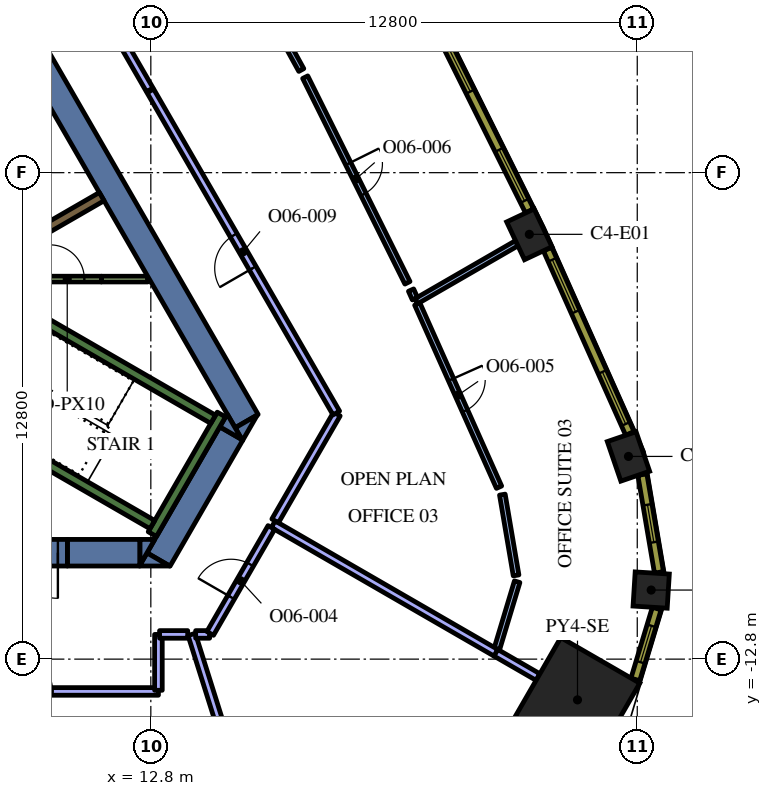
"""IFC4 building model, lengths in metres.
Left out: names, types, materials, properties, quantities, classifications, styles, units other than length and angle.
Written with IfcOpenShell. Run it as: python <this file> out.ifc"""

import sys

from ifc_helpers import new_model, si_unit, direction, frame, frame_2d, origin, origin_2d, place, context, subcontext, project, spatial, polyline, rectangle, outline, extrude, element, fill, save


model = new_model("IFC4")
c1 = context("Model", 3, precision=1e-05, world=origin(), true_north=direction((0.0, 1.0)))
c2 = subcontext(c1, "Body", "Model", "MODEL_VIEW")
j1 = project(units=[si_unit("LENGTHUNIT", "METRE"), si_unit("PLANEANGLEUNIT", "RADIAN")], contexts=[c1])
p1 = place(None, origin())
s1 = spatial("IfcSite", under=j1, at=p1, CompositionType="ELEMENT")
p2 = place(p1, origin())
s2 = spatial("IfcBuilding", under=s1, at=p2, CompositionType="ELEMENT")
p3 = place(p2, frame((0.0, 0.0, 210.0)))
s3 = spatial("IfcBuildingStorey", under=s2, at=p3, CompositionType="ELEMENT", Elevation=210.0)
p4 = place(p3, frame((24.027, -13.872, 0.0), z_axis=(0.0, 0.0, 1.0), x_axis=(0.866025403784, -0.5, 0.0)))
e1 = element("IfcColumn", 1, at=p4, inside=s3, PredefinedType="COLUMN", context=c2, shape_type="SweptSolid", body=[
    extrude(rectangle(XDim=2.4, YDim=2.4, at=origin_2d()), origin(), (0.0, 0.0, 1.0), 4.2),
])
p5 = place(p3, frame((25.967, -10.982, 0.0), z_axis=(0.0, 0.0, 1.0), x_axis=(0.062217428964, 0.998062619044, 0.0)))
e2 = element("IfcColumn", 2, at=p5, inside=s3, PredefinedType="COLUMN", context=c2, shape_type="SweptSolid", body=[
    extrude(rectangle(XDim=0.9, YDim=0.9, at=origin_2d()), origin(), (0.0, 0.0, 1.0), 4.2),
])
for number, where, z_axis, x_axis in (
    (3, (25.369, -7.466, 0.0), (0.0, 0.0, 1.0), (-0.324, 0.946, 0.0)),
    (4, (22.76, -1.623, 0.0), (0.0, 0.0, 1.0), (-0.426, 0.905, 0.0)),
):
    element("IfcColumn", number, at=place(p3, frame(where, z_axis=z_axis, x_axis=x_axis)), inside=s3, PredefinedType="COLUMN", context=c2, shape_type="SweptSolid", body=[
        extrude(rectangle(XDim=1.1, YDim=0.8, at=origin_2d()), origin(), (0.0, 0.0, 1.0), 4.2),
    ])
p6 = place(p3, frame((9.085, 4.264, 0.0), z_axis=(0.0, 0.0, 1.0), x_axis=(0.499998082512, -0.866026510844, 0.0)))
e5 = element("IfcWall", 5, at=p6, inside=s3, PredefinedType="SOLIDWALL", context=c2, shape_type="SweptSolid", body=[
    extrude(rectangle(XDim=12.472, YDim=0.7, at=frame_2d((6.236, 0.0))), origin(), (0.0, 0.0, 1.0), 4.2),
])
p7 = place(p3, origin())
e6 = element("IfcWall", 6, at=p7, inside=s3, PredefinedType="SOLIDWALL", context=c2, shape_type="SweptSolid", body=[
    extrude(outline(polyline([(15.213, -7.05), (15.019, -6.714), (15.601, -6.378), (15.213, -7.05)])), origin(), (0.0, 0.0, 1.0), 4.2),
])
p8 = place(p3, frame((13.003, -10.179, 0.0), z_axis=(0.0, 0.0, 1.0), x_axis=(0.499972675833, 0.866041178825, 0.0)))
e7 = element("IfcWall", 7, at=p8, inside=s3, PredefinedType="SOLIDWALL", context=c2, shape_type="SweptSolid", body=[
    extrude(rectangle(XDim=3.829, YDim=0.7, at=frame_2d((1.915, 0.0))), origin(), (0.0, 0.0, 1.0), 4.2),
])
e8 = element("IfcWall", 8, at=p7, inside=s3, PredefinedType="SOLIDWALL", context=c2, shape_type="SweptSolid", body=[
    extrude(outline(polyline([(12.698, -10.005), (13.296, -10.35), (12.5, -10.35), (12.698, -10.005)])), origin(), (0.0, 0.0, 1.0), 4.2),
])
e9 = element("IfcWall", 9, at=p7, inside=s3, PredefinedType="SOLIDWALL", context=c2, shape_type="SweptSolid", body=[
    extrude(outline(polyline([(14.809, -6.35), (15.197, -7.022), (14.615, -6.686), (14.809, -6.35)])), origin(), (0.0, 0.0, 1.0), 4.2),
])
p9 = place(p3, frame((10.604, -10.0, 0.0), z_axis=(0.0, 0.0, 1.0), x_axis=(1.0, 0.0, 0.0)))
e10 = element("IfcWall", 10, at=p9, inside=s3, PredefinedType="SOLIDWALL", context=c2, shape_type="SweptSolid", body=[
    extrude(rectangle(XDim=1.909, YDim=0.7, at=frame_2d((0.955, 0.0))), origin(), (0.0, 0.0, 1.0), 4.2),
])
e11 = element("IfcWall", 11, at=p7, inside=s3, PredefinedType="SOLIDWALL", context=c2, shape_type="SweptSolid", body=[
    extrude(outline(polyline([(12.904, -9.65), (12.516, -10.322), (12.516, -9.65), (12.904, -9.65)])), origin(), (0.0, 0.0, 1.0), 4.2),
])
p10 = place(p3, frame((12.84, -9.511, 0.0), z_axis=(0.0, 0.0, 1.0), x_axis=(0.500048121057, 0.865997619297, 0.0)))
e12 = element("IfcWall", 12, at=p10, inside=s3, PredefinedType="SOLIDWALL", context=c2, shape_type="SweptSolid", body=[
    extrude(rectangle(XDim=3.634, YDim=0.25, at=frame_2d((1.817, 0.0))), origin(), (0.0, 0.0, 1.0), 4.2),
])
p11 = place(p3, frame((12.84, -9.261, 0.0), z_axis=(0.0, 0.0, 1.0), x_axis=(-0.866013990052, 0.500019768644, 0.0)))
e13 = element("IfcWall", 13, at=p11, inside=s3, PredefinedType="SOLIDWALL", context=c2, shape_type="SweptSolid", body=[
    extrude(rectangle(XDim=6.8, YDim=0.25, at=frame_2d((3.4, 0.0))), origin(), (0.0, 0.0, 1.0), 4.2),
])
p12 = place(p3, frame((8.334, -2.964, 0.0), z_axis=(0.0, 0.0, 1.0), x_axis=(0.866016039709, -0.500016218704, 0.0)))
e14 = element("IfcWall", 14, at=p12, inside=s3, PredefinedType="SOLIDWALL", context=c2, shape_type="SweptSolid", body=[
    extrude(rectangle(XDim=7.05, YDim=0.25, at=frame_2d((3.525, 0.0))), origin(), (0.0, 0.0, 1.0), 4.2),
])
p13 = place(p3, frame((11.507, -0.631, 0.0), z_axis=(0.0, 0.0, 1.0), x_axis=(-0.866011447264, -0.500024172624, 0.0)))
e15 = element("IfcWall", 15, at=p13, inside=s3, PredefinedType="SOLIDWALL", context=c2, shape_type="SweptSolid", body=[
    extrude(rectangle(XDim=5.65, YDim=0.25, at=frame_2d((2.825, 0.0))), origin(), (0.0, 0.0, 1.0), 4.2),
])
p14 = place(p3, frame((11.5, -2.801, 0.0), z_axis=(0.0, 0.0, 1.0), x_axis=(1.0, 0.0, 0.0)))
e16 = element("IfcWall", 16, at=p14, inside=s3, PredefinedType="PARTITIONING", context=c2, shape_type="SweptSolid", body=[
    extrude(rectangle(XDim=1.222, YDim=0.15, at=frame_2d((0.611, 0.0))), origin(), (0.0, 0.0, 1.0), 3.45),
])
p15 = place(p3, frame((10.604, -10.0, 0.0), z_axis=(0.0, 0.0, 1.0), x_axis=(-1.0, 0.0, 0.0)))
e17 = element("IfcWall", 17, at=p15, inside=s3, PredefinedType="SOLIDWALL", context=c2, shape_type="SweptSolid", body=[
    extrude(rectangle(XDim=1.7, YDim=0.7, at=frame_2d((0.85, 0.0))), origin(), (0.0, 0.0, 1.0), 4.2),
])
p16 = place(p15, frame((0.25, 0.0, 0.0)))
e18 = element("IfcOpeningElement", 18, at=p16, cuts=e17, PredefinedType="OPENING", context=c2, shape_type="SweptSolid", body=[
    extrude(rectangle(XDim=1.2, YDim=2.1, at=frame_2d((0.6, 1.05))), frame((0.0, 0.36, 0.0), z_axis=(0.0, -1.0, 0.0), x_axis=(1.0, 0.0, 0.0)), (0.0, 0.0, 1.0), 0.72),
])
p17 = place(p3, frame((9.7, -2.8, 0.0), z_axis=(0.0, 0.0, 1.0), x_axis=(1.0, 0.0, 0.0)))
e19 = element("IfcWall", 19, at=p17, inside=s3, PredefinedType="PARTITIONING", context=c2, shape_type="SweptSolid", body=[
    extrude(rectangle(XDim=1.8, YDim=0.15, at=frame_2d((0.9, 0.0))), origin(), (0.0, 0.0, 1.0), 3.45),
])
p18 = place(p17, frame((0.45, 0.0, 0.0)))
e20 = element("IfcOpeningElement", 20, at=p18, cuts=e19, PredefinedType="OPENING", context=c2, shape_type="SweptSolid", body=[
    extrude(rectangle(XDim=0.9, YDim=2.1, at=frame_2d((0.45, 1.05))), frame((0.0, 0.085, 0.0), z_axis=(0.0, -1.0, 0.0), x_axis=(1.0, 0.0, 0.0)), (0.0, 0.0, 1.0), 0.17),
])
p19 = place(p3, frame((13.875, -12.15, 0.0), z_axis=(0.0, 0.0, 1.0), x_axis=(0.3005606746, -0.953762696316, 0.0)))
e21 = element("IfcWall", 21, at=p19, inside=s3, PredefinedType="PARTITIONING", context=c2, shape_type="SweptSolid", body=[
    extrude(rectangle(XDim=6.9, YDim=0.2, at=frame_2d((3.45, 0.0))), origin(), (0.0, 0.0, 1.0), 3.45),
])
p20 = place(p3, frame((6.517, -13.65, 0.0), z_axis=(0.0, 0.0, 1.0), x_axis=(1.0, 0.0, 0.0)))
e22 = element("IfcWall", 22, at=p20, inside=s3, PredefinedType="PARTITIONING", context=c2, shape_type="SweptSolid", body=[
    extrude(rectangle(XDim=6.483, YDim=0.2, at=frame_2d((3.242, 0.0))), origin(), (0.0, 0.0, 1.0), 3.45),
])
p21 = place(p20, frame((2.7, 0.0, 0.0)))
e23 = element("IfcOpeningElement", 23, at=p21, cuts=e22, PredefinedType="OPENING", context=c2, shape_type="SweptSolid", body=[
    extrude(rectangle(XDim=1.0, YDim=2.1, at=frame_2d((0.5, 1.05))), frame((0.0, 0.11, 0.0), z_axis=(0.0, -1.0, 0.0), x_axis=(1.0, 0.0, 0.0)), (0.0, 0.0, 1.0), 0.22),
])
p22 = place(p3, frame((13.0, -13.62, 0.0), z_axis=(0.0, 0.0, 1.0), x_axis=(0.0, 1.0, 0.0)))
e24 = element("IfcWall", 24, at=p22, inside=s3, PredefinedType="PARTITIONING", context=c2, shape_type="SweptSolid", body=[
    extrude(rectangle(XDim=1.47, YDim=0.2, at=frame_2d((0.735, 0.0))), origin(), (0.0, 0.0, 1.0), 3.45),
])
p23 = place(p3, frame((13.03, -12.15, 0.0), z_axis=(0.0, 0.0, 1.0), x_axis=(1.0, 0.0, 0.0)))
e25 = element("IfcWall", 25, at=p23, inside=s3, PredefinedType="PARTITIONING", context=c2, shape_type="SweptSolid", body=[
    extrude(rectangle(XDim=0.74, YDim=0.2, at=frame_2d((0.37, 0.0))), origin(), (0.0, 0.0, 1.0), 3.45),
])
p24 = place(p3, frame((21.873, -12.628, 0.0), z_axis=(0.0, 0.0, 1.0), x_axis=(0.866052988967, -0.499952218018, 0.0)))
e26 = element("IfcWall", 26, at=p24, inside=s3, PredefinedType="PARTITIONING", context=c2, shape_type="SweptSolid", body=[
    extrude(rectangle(XDim=1.288, YDim=0.2, at=frame_2d((0.644, 0.0))), origin(), (0.0, 0.0, 1.0), 3.45),
])
p25 = place(p3, frame((16.021, -9.25, 0.0), z_axis=(0.0, 0.0, 1.0), x_axis=(0.86602692059, -0.499997372806, 0.0)))
e27 = element("IfcWall", 27, at=p25, inside=s3, PredefinedType="PARTITIONING", context=c2, shape_type="SweptSolid", body=[
    extrude(rectangle(XDim=6.765, YDim=0.2, at=frame_2d((3.382, 0.0))), origin(), (0.0, 0.0, 1.0), 3.45),
])
p26 = place(p3, frame((13.98, -12.15, 0.0), z_axis=(0.0, 0.0, 1.0), x_axis=(1.0, 0.0, 0.0)))
e28 = element("IfcWall", 28, at=p26, inside=s3, PredefinedType="PARTITIONING", context=c2, shape_type="SweptSolid", body=[
    extrude(rectangle(XDim=0.367, YDim=0.2, at=frame_2d((0.184, 0.0))), origin(), (0.0, 0.0, 1.0), 3.45),
])
p27 = place(p3, frame((14.362, -12.124, 0.0), z_axis=(0.0, 0.0, 1.0), x_axis=(0.500022299258, 0.866012528919, 0.0)))
e29 = element("IfcWall", 29, at=p27, inside=s3, PredefinedType="PARTITIONING", context=c2, shape_type="SweptSolid", body=[
    extrude(rectangle(XDim=3.219, YDim=0.2, at=frame_2d((1.609, 0.0))), origin(), (0.0, 0.0, 1.0), 3.45),
])
p28 = place(p27, frame((1.1, 0.0, 0.0)))
e30 = element("IfcOpeningElement", 30, at=p28, cuts=e29, PredefinedType="OPENING", context=c2, shape_type="SweptSolid", body=[
    extrude(rectangle(XDim=1.0, YDim=2.1, at=frame_2d((0.5, 1.05))), frame((0.0, 0.11, 0.0), z_axis=(0.0, -1.0, 0.0), x_axis=(1.0, 0.0, 0.0)), (0.0, 0.0, 1.0), 0.22),
])
p29 = place(p3, frame((19.78, -3.386, 0.0), z_axis=(0.0, 0.0, 1.0), x_axis=(0.866063280451, 0.49993438995, 0.0)))
e31 = element("IfcWall", 31, at=p29, inside=s3, PredefinedType="PARTITIONING", context=c2, shape_type="SweptSolid", body=[
    extrude(rectangle(XDim=3.058, YDim=0.15, at=frame_2d((1.529, 0.0))), origin(), (0.0, 0.0, 1.0), 3.45),
])
p30 = place(p3, frame((21.906, -12.532, 0.0), z_axis=(0.0, 0.0, 1.0), x_axis=(0.288789848591, 0.957392512688, 0.0)))
e32 = element("IfcWall", 32, at=p30, inside=s3, PredefinedType="PARTITIONING", context=c2, shape_type="SweptSolid", body=[
    extrude(rectangle(XDim=1.848, YDim=0.15, at=frame_2d((0.924, 0.0))), origin(), (0.0, 0.0, 1.0), 3.45),
])
p31 = place(p3, frame((22.412, -10.597, 0.0), z_axis=(0.0, 0.0, 1.0), x_axis=(-0.167612004459, 0.985853039738, 0.0)))
e33 = element("IfcWall", 33, at=p31, inside=s3, PredefinedType="PARTITIONING", context=c2, shape_type="SweptSolid", body=[
    extrude(rectangle(XDim=2.156, YDim=0.15, at=frame_2d((1.078, 0.0))), origin(), (0.0, 0.0, 1.0), 3.45),
])
p32 = place(p3, frame((19.811, -3.455, 0.0), z_axis=(0.0, 0.0, 1.0), x_axis=(0.407605393886, -0.913158169692, 0.0)))
e34 = element("IfcWall", 34, at=p32, inside=s3, PredefinedType="PARTITIONING", context=c2, shape_type="SweptSolid", body=[
    extrude(rectangle(XDim=5.279, YDim=0.15, at=frame_2d((2.64, 0.0))), origin(), (0.0, 0.0, 1.0), 3.45),
])
p33 = place(p32, frame((2.179, 0.0, 0.0)))
e35 = element("IfcOpeningElement", 35, at=p33, cuts=e34, PredefinedType="OPENING", context=c2, shape_type="SweptSolid", body=[
    extrude(rectangle(XDim=0.9, YDim=2.1, at=frame_2d((0.45, 1.05))), frame((0.0, 0.085, 0.0), z_axis=(0.0, -1.0, 0.0), x_axis=(1.0, 0.0, 0.0)), (0.0, 0.0, 1.0), 0.17),
])
p34 = place(p3, frame((19.75, -3.317, 0.0), z_axis=(0.0, 0.0, 1.0), x_axis=(-0.406774979688, 0.913528388119, 0.0)))
e36 = element("IfcWall", 36, at=p34, inside=s3, PredefinedType="PARTITIONING", context=c2, shape_type="SweptSolid", body=[
    extrude(rectangle(XDim=0.249, YDim=0.15, at=frame_2d((0.125, 0.0))), origin(), (0.0, 0.0, 1.0), 3.45),
])
p35 = place(p3, frame((16.863, 2.513, 0.0), z_axis=(0.0, 0.0, 1.0), x_axis=(0.445159947046, -0.895451071553, 0.0)))
e37 = element("IfcWall", 37, at=p35, inside=s3, PredefinedType="PARTITIONING", context=c2, shape_type="SweptSolid", body=[
    extrude(rectangle(XDim=6.043, YDim=0.15, at=frame_2d((3.021, 0.0))), origin(), (0.0, 0.0, 1.0), 3.45),
])
p36 = place(p35, frame((2.542, 0.0, 0.0)))
e38 = element("IfcOpeningElement", 38, at=p36, cuts=e37, PredefinedType="OPENING", context=c2, shape_type="SweptSolid", body=[
    extrude(rectangle(XDim=0.9, YDim=2.1, at=frame_2d((0.45, 1.05))), frame((0.0, 0.085, 0.0), z_axis=(0.0, -1.0, 0.0), x_axis=(1.0, 0.0, 0.0)), (0.0, 0.0, 1.0), 0.17),
])
p37 = place(p3, frame((16.76, 2.7, 0.0), z_axis=(0.0, 0.0, 1.0), x_axis=(-0.481907755985, 0.876221955169, 0.0)))
e39 = element("IfcWall", 39, at=p37, inside=s3, PredefinedType="PARTITIONING", context=c2, shape_type="SweptSolid", body=[
    extrude(rectangle(XDim=5.967, YDim=0.15, at=frame_2d((2.984, 0.0))), origin(), (0.0, 0.0, 1.0), 3.45),
])
p38 = place(p3, frame((12.772, 2.178, 0.0), z_axis=(0.0, 0.0, 1.0), x_axis=(-0.5000018851, 0.866024315419, 0.0)))
e40 = element("IfcWall", 40, at=p38, inside=s3, PredefinedType="PARTITIONING", context=c2, shape_type="SweptSolid", body=[
    extrude(rectangle(XDim=9.0, YDim=0.2, at=frame_2d((4.5, 0.0))), origin(), (0.0, 0.0, 1.0), 3.45),
])
p39 = place(p3, frame((16.072, -9.163, 0.0), z_axis=(0.0, 0.0, 1.0), x_axis=(0.500010870188, 0.866019127788, 0.0)))
e41 = element("IfcWall", 41, at=p39, inside=s3, PredefinedType="PARTITIONING", context=c2, shape_type="SweptSolid", body=[
    extrude(rectangle(XDim=3.249, YDim=0.2, at=frame_2d((1.624, 0.0))), origin(), (0.0, 0.0, 1.0), 3.45),
])
p40 = place(p3, frame((17.681, -6.324, 0.0), z_axis=(0.0, 0.0, 1.0), x_axis=(-0.500021153861, 0.866013190252, 0.0)))
e42 = element("IfcWall", 42, at=p40, inside=s3, PredefinedType="PARTITIONING", context=c2, shape_type="SweptSolid", body=[
    extrude(rectangle(XDim=9.787, YDim=0.2, at=frame_2d((4.894, 0.0))), origin(), (0.0, 0.0, 1.0), 3.45),
])
p41 = place(p40, frame((4.4, 0.0, 0.0)))
e43 = element("IfcOpeningElement", 43, at=p41, cuts=e42, PredefinedType="OPENING", context=c2, shape_type="SweptSolid", body=[
    extrude(rectangle(XDim=1.0, YDim=2.1, at=frame_2d((0.5, 1.05))), frame((0.0, 0.11, 0.0), z_axis=(0.0, -1.0, 0.0), x_axis=(1.0, 0.0, 0.0)), (0.0, 0.0, 1.0), 0.22),
])
p42 = place(p3, frame((25.55, -13.335, 0.0), z_axis=(0.0, 0.0, 1.0), x_axis=(0.288727209095, 0.957411405159, 0.0)))
e44 = element("IfcWall", 44, at=p42, inside=s3, PredefinedType="SOLIDWALL", context=c2, shape_type="SweptSolid", body=[
    extrude(rectangle(XDim=1.948, YDim=0.24, at=frame_2d((0.974, 0.0))), origin(), (0.0, 0.0, 1.0), 3.95),
])
p43 = place(p42, frame((0.474, 0.0, 0.9)))
e45 = element("IfcOpeningElement", 45, at=p43, cuts=e44, PredefinedType="OPENING", context=c2, shape_type="SweptSolid", body=[
    extrude(rectangle(XDim=1.0, YDim=2.55, at=frame_2d((0.5, 1.275))), frame((0.0, 0.13, 0.0), z_axis=(0.0, -1.0, 0.0), x_axis=(1.0, 0.0, 0.0)), (0.0, 0.0, 1.0), 0.26),
])
p44 = place(p3, frame((26.172, -10.517, 0.0), z_axis=(0.0, 0.0, 1.0), x_axis=(-0.167660055546, 0.985844869021, 0.0)))
e46 = element("IfcWall", 46, at=p44, inside=s3, PredefinedType="SOLIDWALL", context=c2, shape_type="SweptSolid", body=[
    extrude(rectangle(XDim=2.609, YDim=0.24, at=frame_2d((1.305, 0.0))), origin(), (0.0, 0.0, 1.0), 3.95),
])
p45 = place(p44, frame((0.805, 0.0, 0.9)))
e47 = element("IfcOpeningElement", 47, at=p45, cuts=e46, PredefinedType="OPENING", context=c2, shape_type="SweptSolid", body=[
    extrude(rectangle(XDim=1.0, YDim=2.55, at=frame_2d((0.5, 1.275))), frame((0.0, 0.13, 0.0), z_axis=(0.0, -1.0, 0.0), x_axis=(1.0, 0.0, 0.0)), (0.0, 0.0, 1.0), 0.26),
])
p46 = place(p3, frame((25.405, -6.861, 0.0), z_axis=(0.0, 0.0, 1.0), x_axis=(-0.407579651789, 0.913169659728, 0.0)))
e48 = element("IfcWall", 48, at=p46, inside=s3, PredefinedType="SOLIDWALL", context=c2, shape_type="SweptSolid", body=[
    extrude(rectangle(XDim=5.311, YDim=0.24, at=frame_2d((2.655, 0.0))), origin(), (0.0, 0.0, 1.0), 3.95),
])
p47 = place(p46, frame((0.271, 0.0, 0.9)))
e49 = element("IfcOpeningElement", 49, at=p47, cuts=e48, PredefinedType="OPENING", context=c2, shape_type="SweptSolid", body=[
    extrude(rectangle(XDim=1.5, YDim=2.55, at=frame_2d((0.75, 1.275))), frame((0.0, 0.13, 0.0), z_axis=(0.0, -1.0, 0.0), x_axis=(1.0, 0.0, 0.0)), (0.0, 0.0, 1.0), 0.26),
])
p48 = place(p46, frame((3.504, 0.0, 0.9)))
e50 = element("IfcOpeningElement", 50, at=p48, cuts=e48, PredefinedType="OPENING", context=c2, shape_type="SweptSolid", body=[
    extrude(rectangle(XDim=1.5, YDim=2.55, at=frame_2d((0.75, 1.275))), frame((0.0, 0.13, 0.0), z_axis=(0.0, -1.0, 0.0), x_axis=(1.0, 0.0, 0.0)), (0.0, 0.0, 1.0), 0.26),
])
p49 = place(p3, frame((22.766, -1.005, 0.0), z_axis=(0.0, 0.0, 1.0), x_axis=(-0.445129582031, 0.895466166419, 0.0)))
e51 = element("IfcWall", 51, at=p49, inside=s3, PredefinedType="SOLIDWALL", context=c2, shape_type="SweptSolid", body=[
    extrude(rectangle(XDim=5.298, YDim=0.24, at=frame_2d((2.649, 0.0))), origin(), (0.0, 0.0, 1.0), 3.95),
])
p50 = place(p49, frame((0.295, 0.0, 0.9)))
e52 = element("IfcOpeningElement", 52, at=p50, cuts=e51, PredefinedType="OPENING", context=c2, shape_type="SweptSolid", body=[
    extrude(rectangle(XDim=1.5, YDim=2.55, at=frame_2d((0.75, 1.275))), frame((0.0, 0.13, 0.0), z_axis=(0.0, -1.0, 0.0), x_axis=(1.0, 0.0, 0.0)), (0.0, 0.0, 1.0), 0.26),
])
p51 = place(p49, frame((3.504, 0.0, 0.9)))
e53 = element("IfcOpeningElement", 53, at=p51, cuts=e51, PredefinedType="OPENING", context=c2, shape_type="SweptSolid", body=[
    extrude(rectangle(XDim=1.5, YDim=2.55, at=frame_2d((0.75, 1.275))), frame((0.0, 0.13, 0.0), z_axis=(0.0, -1.0, 0.0), x_axis=(1.0, 0.0, 0.0)), (0.0, 0.0, 1.0), 0.26),
])
p52 = place(p16, origin())
e54 = element("IfcDoor", 54, at=p52, inside=s3, OperationType="SINGLE_SWING_LEFT", PredefinedType="DOOR", context=c2, shape_type="SweptSolid", body=[
    extrude(rectangle(XDim=1.2, YDim=2.1, at=frame_2d((0.6, 1.05))), frame((0.0, 0.025, 0.0), z_axis=(0.0, -1.0, 0.0), x_axis=(1.0, 0.0, 0.0)), (0.0, 0.0, 1.0), 0.05),
])
fill(e18, e54)
p53 = place(p18, origin())
e55 = element("IfcDoor", 55, at=p53, inside=s3, OperationType="SINGLE_SWING_LEFT", PredefinedType="DOOR", context=c2, shape_type="SweptSolid", body=[
    extrude(rectangle(XDim=0.9, YDim=2.1, at=frame_2d((0.45, 1.05))), frame((0.0, 0.025, 0.0), z_axis=(0.0, -1.0, 0.0), x_axis=(1.0, 0.0, 0.0)), (0.0, 0.0, 1.0), 0.05),
])
fill(e20, e55)
p54 = place(p21, origin())
e56 = element("IfcDoor", 56, at=p54, inside=s3, OperationType="SINGLE_SWING_LEFT", PredefinedType="DOOR", context=c2, shape_type="SweptSolid", body=[
    extrude(rectangle(XDim=1.0, YDim=2.1, at=frame_2d((0.5, 1.05))), frame((0.0, 0.025, 0.0), z_axis=(0.0, -1.0, 0.0), x_axis=(1.0, 0.0, 0.0)), (0.0, 0.0, 1.0), 0.05),
])
fill(e23, e56)
p55 = place(p28, origin())
e57 = element("IfcDoor", 57, at=p55, inside=s3, OperationType="SINGLE_SWING_LEFT", PredefinedType="DOOR", context=c2, shape_type="SweptSolid", body=[
    extrude(rectangle(XDim=1.0, YDim=2.1, at=frame_2d((0.5, 1.05))), frame((0.0, 0.025, 0.0), z_axis=(0.0, -1.0, 0.0), x_axis=(1.0, 0.0, 0.0)), (0.0, 0.0, 1.0), 0.05),
])
fill(e30, e57)
p56 = place(p33, origin())
e58 = element("IfcDoor", 58, at=p56, inside=s3, OperationType="SINGLE_SWING_LEFT", PredefinedType="DOOR", context=c2, shape_type="SweptSolid", body=[
    extrude(rectangle(XDim=0.9, YDim=2.1, at=frame_2d((0.45, 1.05))), frame((0.0, 0.025, 0.0), z_axis=(0.0, -1.0, 0.0), x_axis=(1.0, 0.0, 0.0)), (0.0, 0.0, 1.0), 0.05),
])
fill(e35, e58)
p57 = place(p36, origin())
e59 = element("IfcDoor", 59, at=p57, inside=s3, OperationType="SINGLE_SWING_LEFT", PredefinedType="DOOR", context=c2, shape_type="SweptSolid", body=[
    extrude(rectangle(XDim=0.9, YDim=2.1, at=frame_2d((0.45, 1.05))), frame((0.0, 0.025, 0.0), z_axis=(0.0, -1.0, 0.0), x_axis=(1.0, 0.0, 0.0)), (0.0, 0.0, 1.0), 0.05),
])
fill(e38, e59)
p58 = place(p41, origin())
e60 = element("IfcDoor", 60, at=p58, inside=s3, OperationType="SINGLE_SWING_RIGHT", PredefinedType="DOOR", context=c2, shape_type="SweptSolid", body=[
    extrude(rectangle(XDim=1.0, YDim=2.1, at=frame_2d((0.5, 1.05))), frame((0.0, 0.025, 0.0), z_axis=(0.0, -1.0, 0.0), x_axis=(1.0, 0.0, 0.0)), (0.0, 0.0, 1.0), 0.05),
])
fill(e43, e60)
p59 = place(p43, origin())
e61 = element("IfcWindow", 61, at=p59, inside=s3, PartitioningType="SINGLE_PANEL", PredefinedType="WINDOW", context=c2, shape_type="SweptSolid", body=[
    extrude(rectangle(XDim=1.0, YDim=2.55, at=frame_2d((0.5, 1.275))), frame((0.0, 0.04, 0.0), z_axis=(0.0, -1.0, 0.0), x_axis=(1.0, 0.0, 0.0)), (0.0, 0.0, 1.0), 0.06),
])
fill(e45, e61)
p60 = place(p45, origin())
e62 = element("IfcWindow", 62, at=p60, inside=s3, PartitioningType="SINGLE_PANEL", PredefinedType="WINDOW", context=c2, shape_type="SweptSolid", body=[
    extrude(rectangle(XDim=1.0, YDim=2.55, at=frame_2d((0.5, 1.275))), frame((0.0, 0.04, 0.0), z_axis=(0.0, -1.0, 0.0), x_axis=(1.0, 0.0, 0.0)), (0.0, 0.0, 1.0), 0.06),
])
fill(e47, e62)
p61 = place(p47, origin())
e63 = element("IfcWindow", 63, at=p61, inside=s3, PartitioningType="SINGLE_PANEL", PredefinedType="WINDOW", context=c2, shape_type="SweptSolid", body=[
    extrude(rectangle(XDim=1.5, YDim=2.55, at=frame_2d((0.75, 1.275))), frame((0.0, 0.04, 0.0), z_axis=(0.0, -1.0, 0.0), x_axis=(1.0, 0.0, 0.0)), (0.0, 0.0, 1.0), 0.06),
])
fill(e49, e63)
p62 = place(p48, origin())
e64 = element("IfcWindow", 64, at=p62, inside=s3, PartitioningType="SINGLE_PANEL", PredefinedType="WINDOW", context=c2, shape_type="SweptSolid", body=[
    extrude(rectangle(XDim=1.5, YDim=2.55, at=frame_2d((0.75, 1.275))), frame((0.0, 0.04, 0.0), z_axis=(0.0, -1.0, 0.0), x_axis=(1.0, 0.0, 0.0)), (0.0, 0.0, 1.0), 0.06),
])
fill(e50, e64)
p63 = place(p50, origin())
e65 = element("IfcWindow", 65, at=p63, inside=s3, PartitioningType="SINGLE_PANEL", PredefinedType="WINDOW", context=c2, shape_type="SweptSolid", body=[
    extrude(rectangle(XDim=1.5, YDim=2.55, at=frame_2d((0.75, 1.275))), frame((0.0, 0.04, 0.0), z_axis=(0.0, -1.0, 0.0), x_axis=(1.0, 0.0, 0.0)), (0.0, 0.0, 1.0), 0.06),
])
fill(e52, e65)
p64 = place(p51, origin())
e66 = element("IfcWindow", 66, at=p64, inside=s3, PartitioningType="SINGLE_PANEL", PredefinedType="WINDOW", context=c2, shape_type="SweptSolid", body=[
    extrude(rectangle(XDim=1.5, YDim=2.55, at=frame_2d((0.75, 1.275))), frame((0.0, 0.04, 0.0), z_axis=(0.0, -1.0, 0.0), x_axis=(1.0, 0.0, 0.0)), (0.0, 0.0, 1.0), 0.06),
])
fill(e53, e66)
save(model, sys.argv[1])
